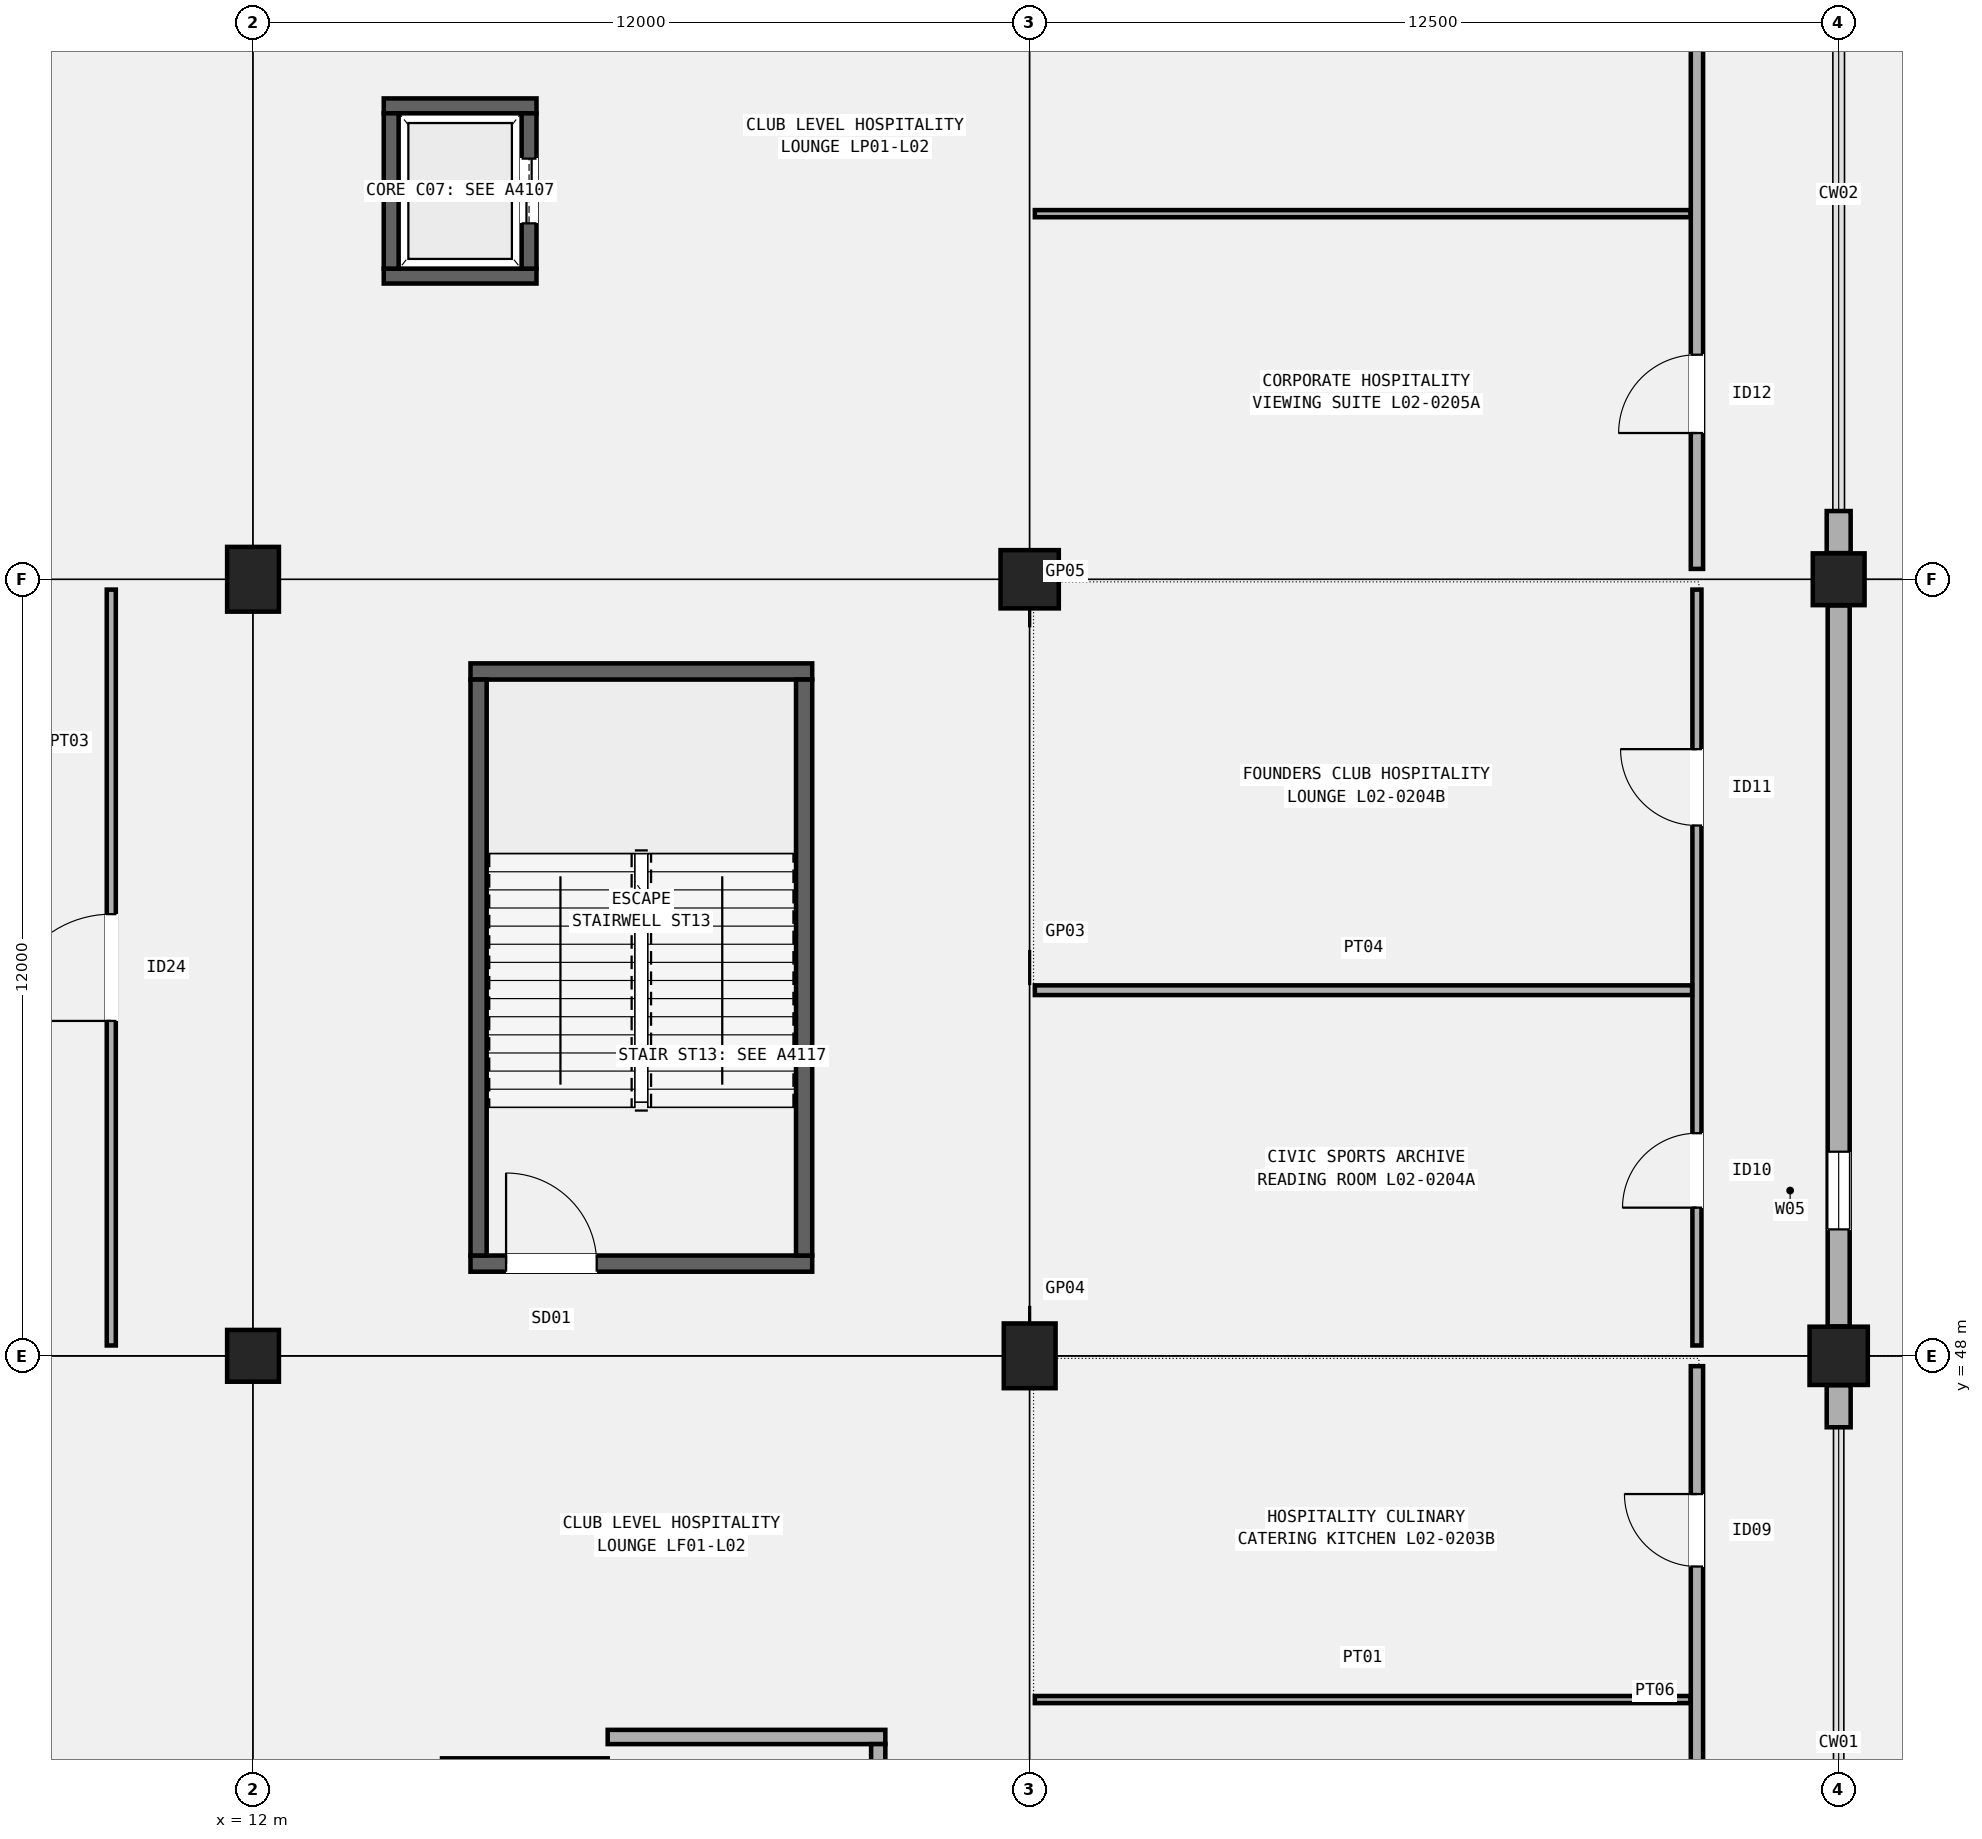
"""IFC4 building model, lengths in metres.
Left out: names, types, materials, properties, quantities, classifications, styles, units other than length and angle.
Written with IfcOpenShell. Run it as: python <this file> out.ifc"""

import sys

from ifc_helpers import new_model, si_unit, direction, frame, frame_2d, origin, origin_2d, place, context, subcontext, project, spatial, rectangle, extrude, element, fill, save


model = new_model("IFC4")
c1 = context("Model", 3, precision=1e-05, world=origin(), true_north=direction((0.0, 1.0)))
c2 = subcontext(c1, "Body", "Model", "MODEL_VIEW")
j1 = project(units=[si_unit("LENGTHUNIT", "METRE"), si_unit("PLANEANGLEUNIT", "RADIAN")], contexts=[c1])
p1 = place(None, origin())
s1 = spatial("IfcSite", under=j1, at=p1, CompositionType="ELEMENT")
p2 = place(p1, origin())
s2 = spatial("IfcBuilding", under=s1, at=p2, CompositionType="ELEMENT")
p3 = place(p2, frame((0.0, 0.0, 10.2)))
s3 = spatial("IfcBuildingStorey", under=s2, at=p3, CompositionType="ELEMENT", Elevation=10.2)
p4 = place(p3, frame((12.0, 48.0, 0.0), z_axis=(0.0, 0.0, 1.0), x_axis=(1.0, 0.0, 0.0)))
e1 = element("IfcColumn", 1, at=p4, inside=s3, PredefinedType="COLUMN", context=c2, shape_type="SweptSolid", body=[
    extrude(rectangle(XDim=0.8, YDim=0.8, at=origin_2d()), origin(), (0.0, 0.0, 1.0), 5.1),
])
for number, where, z_axis, x_axis in (
    (2, (12.0, 60.0, 0.0), (0.0, 0.0, 1.0), (1.0, 0.0, 0.0)),
    (3, (24.0, 48.0, 0.0), (0.0, 0.0, 1.0), (1.0, 0.0, 0.0)),
):
    element("IfcColumn", number, at=place(p3, frame(where, z_axis=z_axis, x_axis=x_axis)), inside=s3, PredefinedType="COLUMN", context=c2, shape_type="SweptSolid", body=[
        extrude(rectangle(XDim=0.8, YDim=1.0, at=origin_2d()), origin(), (0.0, 0.0, 1.0), 5.1),
    ])
for number, where, z_axis, x_axis in (
    (4, (24.0, 60.0, 0.0), (0.0, 0.0, 1.0), (1.0, 0.0, 0.0)),
    (5, (36.5, 48.0, 0.0), (0.0, 0.0, 1.0), (1.0, 0.0, 0.0)),
):
    element("IfcColumn", number, at=place(p3, frame(where, z_axis=z_axis, x_axis=x_axis)), inside=s3, PredefinedType="COLUMN", context=c2, shape_type="SweptSolid", body=[
        extrude(rectangle(XDim=0.9, YDim=0.9, at=origin_2d()), origin(), (0.0, 0.0, 1.0), 5.1),
    ])
p5 = place(p3, frame((36.5, 60.0, 0.0), z_axis=(0.0, 0.0, 1.0), x_axis=(1.0, 0.0, 0.0)))
e6 = element("IfcColumn", 6, at=p5, inside=s3, PredefinedType="COLUMN", context=c2, shape_type="SweptSolid", body=[
    extrude(rectangle(XDim=0.8, YDim=0.8, at=origin_2d()), origin(), (0.0, 0.0, 1.0), 5.1),
])
p6 = place(p3, frame((36.5, 46.896, 0.0), z_axis=(0.0, 0.0, 1.0), x_axis=(0.0, 1.0, 0.0)))
e7 = element("IfcWall", 7, at=p6, inside=s3, PredefinedType="SOLIDWALL", context=c2, shape_type="SweptSolid", body=[
    extrude(rectangle(XDim=0.65, YDim=0.37, at=frame_2d((0.325, 0.0))), origin(), (0.0, 0.0, 1.0), 4.02),
])
p7 = place(p3, frame((36.5, 48.454, 0.0), z_axis=(0.0, 0.0, 1.0), x_axis=(0.0, 1.0, 0.0)))
e8 = element("IfcWall", 8, at=p7, inside=s3, PredefinedType="SOLIDWALL", context=c2, shape_type="SweptSolid", body=[
    extrude(rectangle(XDim=11.142, YDim=0.34, at=frame_2d((5.571, 0.0))), origin(), (0.0, 0.0, 1.0), 4.12),
])
p8 = place(p7, frame((1.5, 0.0, 0.95)))
e9 = element("IfcOpeningElement", 9, at=p8, cuts=e8, PredefinedType="OPENING", context=c2, shape_type="SweptSolid", body=[
    extrude(rectangle(XDim=1.2, YDim=1.9, at=frame_2d((0.6, 0.95))), frame((0.0, 0.18, 0.0), z_axis=(0.0, -1.0, 0.0), x_axis=(1.0, 0.0, 0.0)), (0.0, 0.0, 1.0), 0.36),
])
p9 = place(p3, frame((36.5, 60.404, 0.0), z_axis=(0.0, 0.0, 1.0), x_axis=(0.0, 1.0, 0.0)))
e10 = element("IfcWall", 10, at=p9, inside=s3, PredefinedType="SOLIDWALL", context=c2, shape_type="SweptSolid", body=[
    extrude(rectangle(XDim=0.65, YDim=0.37, at=frame_2d((0.325, 0.0))), origin(), (0.0, 0.0, 1.0), 4.232),
])
p10 = place(p3, frame((15.36, 49.425, 0.0), z_axis=(0.0, 0.0, 1.0), x_axis=(1.0, 0.0, 0.0)))
e11 = element("IfcWall", 11, at=p10, inside=s3, PredefinedType="SHEAR", context=c2, shape_type="SweptSolid", body=[
    extrude(rectangle(XDim=5.28, YDim=0.25, at=frame_2d((2.64, 0.0))), origin(), (0.0, 0.0, 1.0), 4.82),
])
p11 = place(p10, frame((0.55, 0.0, 0.0)))
e12 = element("IfcOpeningElement", 12, at=p11, cuts=e11, PredefinedType="OPENING", context=c2, shape_type="SweptSolid", body=[
    extrude(rectangle(XDim=1.4, YDim=2.15, at=frame_2d((0.7, 1.075))), frame((0.0, 0.135, 0.0), z_axis=(0.0, -1.0, 0.0), x_axis=(1.0, 0.0, 0.0)), (0.0, 0.0, 1.0), 0.27),
])
p12 = place(p3, frame((15.36, 58.575, 0.0), z_axis=(0.0, 0.0, 1.0), x_axis=(1.0, 0.0, 0.0)))
e13 = element("IfcWall", 13, at=p12, inside=s3, PredefinedType="SHEAR", context=c2, shape_type="SweptSolid", body=[
    extrude(rectangle(XDim=5.28, YDim=0.25, at=frame_2d((2.64, 0.0))), origin(), (0.0, 0.0, 1.0), 4.82),
])
for number, where, z_axis, x_axis in (
    (14, (15.485, 49.55, 0.0), (0.0, 0.0, 1.0), (0.0, 1.0, 0.0)),
    (15, (20.515, 49.55, 0.0), (0.0, 0.0, 1.0), (0.0, 1.0, 0.0)),
):
    element("IfcWall", number, at=place(p3, frame(where, z_axis=z_axis, x_axis=x_axis)), inside=s3, PredefinedType="SHEAR", context=c2, shape_type="SweptSolid", body=[
        extrude(rectangle(XDim=8.9, YDim=0.25, at=frame_2d((4.45, 0.0))), origin(), (0.0, 0.0, 1.0), 4.82),
    ])
p13 = place(p3, frame((14.92, 41.665, 0.0), z_axis=(0.0, 0.0, 1.0), x_axis=(1.0, 0.0, 0.0)))
e16 = element("IfcWall", 16, at=p13, inside=s3, PredefinedType="SHEAR", context=c2, shape_type="SweptSolid", body=[
    extrude(rectangle(XDim=2.56, YDim=0.23, at=frame_2d((1.28, 0.0))), origin(), (0.0, 0.0, 1.0), 4.82),
])
p14 = place(p3, frame((17.48, 42.11, 0.0), z_axis=(0.0, 0.0, 1.0), x_axis=(1.0, 0.0, 0.0)))
e17 = element("IfcWall", 17, at=p14, inside=s3, PredefinedType="SOLIDWALL", context=c2, shape_type="SweptSolid", body=[
    extrude(rectangle(XDim=4.29, YDim=0.22, at=frame_2d((2.145, 0.0))), origin(), (0.0, 0.0, 1.0), 4.22),
])
p15 = place(p3, frame((21.66, 38.4, 0.0), z_axis=(0.0, 0.0, 1.0), x_axis=(0.0, 1.0, 0.0)))
e18 = element("IfcWall", 18, at=p15, inside=s3, PredefinedType="SOLIDWALL", context=c2, shape_type="SweptSolid", body=[
    extrude(rectangle(XDim=3.6, YDim=0.22, at=frame_2d((1.8, 0.0))), origin(), (0.0, 0.0, 1.0), 4.22),
])
p16 = place(p15, frame((1.15, 0.0, 0.0)))
e19 = element("IfcOpeningElement", 19, at=p16, cuts=e18, PredefinedType="OPENING", context=c2, shape_type="SweptSolid", body=[
    extrude(rectangle(XDim=1.3, YDim=2.15, at=frame_2d((0.65, 1.075))), frame((0.0, 0.12, 0.0), z_axis=(0.0, -1.0, 0.0), x_axis=(1.0, 0.0, 0.0)), (0.0, 0.0, 1.0), 0.24),
])
for number, where, z_axis, x_axis in (
    (20, (14.02, 64.685, 0.0), (0.0, 0.0, 1.0), (1.0, 0.0, 0.0)),
    (21, (14.02, 67.315, 0.0), (0.0, 0.0, 1.0), (1.0, 0.0, 0.0)),
):
    element("IfcWall", number, at=place(p3, frame(where, z_axis=z_axis, x_axis=x_axis)), inside=s3, PredefinedType="SHEAR", context=c2, shape_type="SweptSolid", body=[
        extrude(rectangle(XDim=2.36, YDim=0.23, at=frame_2d((1.18, 0.0))), origin(), (0.0, 0.0, 1.0), 4.82),
    ])
p17 = place(p3, frame((14.135, 64.8, 0.0), z_axis=(0.0, 0.0, 1.0), x_axis=(0.0, 1.0, 0.0)))
e22 = element("IfcWall", 22, at=p17, inside=s3, PredefinedType="SHEAR", context=c2, shape_type="SweptSolid", body=[
    extrude(rectangle(XDim=2.4, YDim=0.23, at=frame_2d((1.2, 0.0))), origin(), (0.0, 0.0, 1.0), 4.82),
])
p18 = place(p3, frame((16.265, 64.8, 0.0), z_axis=(0.0, 0.0, 1.0), x_axis=(0.0, 1.0, 0.0)))
e23 = element("IfcWall", 23, at=p18, inside=s3, PredefinedType="SHEAR", context=c2, shape_type="SweptSolid", body=[
    extrude(rectangle(XDim=2.4, YDim=0.23, at=frame_2d((1.2, 0.0))), origin(), (0.0, 0.0, 1.0), 4.82),
])
p19 = place(p18, frame((0.7, 0.0, 0.0)))
e24 = element("IfcOpeningElement", 24, at=p19, cuts=e23, PredefinedType="OPENING", context=c2, shape_type="SweptSolid", body=[
    extrude(rectangle(XDim=1.0, YDim=2.15, at=frame_2d((0.5, 1.075))), frame((0.0, 0.125, 0.0), z_axis=(0.0, -1.0, 0.0), x_axis=(1.0, 0.0, 0.0)), (0.0, 0.0, 1.0), 0.25),
])
p20 = place(p3, frame((9.81, 48.16, 0.0), z_axis=(0.0, 0.0, 1.0), x_axis=(0.0, 1.0, 0.0)))
e25 = element("IfcWall", 25, at=p20, inside=s3, PredefinedType="PARTITIONING", context=c2, shape_type="SweptSolid", body=[
    extrude(rectangle(XDim=11.68, YDim=0.14, at=frame_2d((5.84, 0.0))), origin(), (0.0, 0.0, 1.0), 4.22),
])
p21 = place(p20, frame((5.015, 0.0, 0.0)))
e26 = element("IfcOpeningElement", 26, at=p21, cuts=e25, PredefinedType="OPENING", context=c2, shape_type="SweptSolid", body=[
    extrude(rectangle(XDim=1.65, YDim=2.28, at=frame_2d((0.825, 1.14))), frame((0.0, 0.08, 0.0), z_axis=(0.0, -1.0, 0.0), x_axis=(1.0, 0.0, 0.0)), (0.0, 0.0, 1.0), 0.16),
])
p22 = place(p3, frame((34.31, 38.12, 0.0), z_axis=(0.0, 0.0, 1.0), x_axis=(0.0, 1.0, 0.0)))
e27 = element("IfcWall", 27, at=p22, inside=s3, PredefinedType="PARTITIONING", context=c2, shape_type="SweptSolid", body=[
    extrude(rectangle(XDim=9.72, YDim=0.19, at=frame_2d((4.86, 0.0))), origin(), (0.0, 0.0, 1.0), 4.22),
])
p23 = place(p22, frame((1.699, 0.0, 0.0)))
e28 = element("IfcOpeningElement", 28, at=p23, cuts=e27, PredefinedType="OPENING", context=c2, shape_type="SweptSolid", body=[
    extrude(rectangle(XDim=1.09, YDim=2.16, at=frame_2d((0.545, 1.08))), frame((0.0, 0.105, 0.0), z_axis=(0.0, -1.0, 0.0), x_axis=(1.0, 0.0, 0.0)), (0.0, 0.0, 1.0), 0.21),
])
p24 = place(p22, frame((6.624, 0.0, 0.0)))
e29 = element("IfcOpeningElement", 29, at=p24, cuts=e27, PredefinedType="OPENING", context=c2, shape_type="SweptSolid", body=[
    extrude(rectangle(XDim=1.12, YDim=2.18, at=frame_2d((0.56, 1.09))), frame((0.0, 0.105, 0.0), z_axis=(0.0, -1.0, 0.0), x_axis=(1.0, 0.0, 0.0)), (0.0, 0.0, 1.0), 0.21),
])
p25 = place(p3, frame((24.08, 42.688, 0.0), z_axis=(0.0, 0.0, 1.0), x_axis=(1.0, 0.0, 0.0)))
e30 = element("IfcWall", 30, at=p25, inside=s3, PredefinedType="PARTITIONING", context=c2, shape_type="SweptSolid", body=[
    extrude(rectangle(XDim=10.13, YDim=0.11, at=frame_2d((5.065, 0.0))), origin(), (0.0, 0.0, 1.0), 4.22),
])
p26 = place(p3, frame((34.31, 48.16, 0.0), z_axis=(0.0, 0.0, 1.0), x_axis=(0.0, 1.0, 0.0)))
e31 = element("IfcWall", 31, at=p26, inside=s3, PredefinedType="PARTITIONING", context=c2, shape_type="SweptSolid", body=[
    extrude(rectangle(XDim=11.68, YDim=0.14, at=frame_2d((5.84, 0.0))), origin(), (0.0, 0.0, 1.0), 4.22),
])
p27 = place(p26, frame((2.13, 0.0, 0.0)))
e32 = element("IfcOpeningElement", 32, at=p27, cuts=e31, PredefinedType="OPENING", context=c2, shape_type="SweptSolid", body=[
    extrude(rectangle(XDim=1.15, YDim=2.15, at=frame_2d((0.575, 1.075))), frame((0.0, 0.08, 0.0), z_axis=(0.0, -1.0, 0.0), x_axis=(1.0, 0.0, 0.0)), (0.0, 0.0, 1.0), 0.16),
])
p28 = place(p26, frame((8.035, 0.0, 0.0)))
e33 = element("IfcOpeningElement", 33, at=p28, cuts=e31, PredefinedType="OPENING", context=c2, shape_type="SweptSolid", body=[
    extrude(rectangle(XDim=1.18, YDim=2.2, at=frame_2d((0.59, 1.1))), frame((0.0, 0.08, 0.0), z_axis=(0.0, -1.0, 0.0), x_axis=(1.0, 0.0, 0.0)), (0.0, 0.0, 1.0), 0.16),
])
p29 = place(p3, frame((24.08, 53.65, 0.0), z_axis=(0.0, 0.0, 1.0), x_axis=(1.0, 0.0, 0.0)))
e34 = element("IfcWall", 34, at=p29, inside=s3, PredefinedType="PARTITIONING", context=c2, shape_type="SweptSolid", body=[
    extrude(rectangle(XDim=10.155, YDim=0.15, at=frame_2d((5.078, 0.0))), origin(), (0.0, 0.0, 1.0), 4.22),
])
p30 = place(p3, frame((34.31, 60.16, 0.0), z_axis=(0.0, 0.0, 1.0), x_axis=(0.0, 1.0, 0.0)))
e35 = element("IfcWall", 35, at=p30, inside=s3, PredefinedType="PARTITIONING", context=c2, shape_type="SweptSolid", body=[
    extrude(rectangle(XDim=11.68, YDim=0.19, at=frame_2d((5.84, 0.0))), origin(), (0.0, 0.0, 1.0), 4.22),
])
p31 = place(p30, frame((2.1, 0.0, 0.0)))
e36 = element("IfcOpeningElement", 36, at=p31, cuts=e35, PredefinedType="OPENING", context=c2, shape_type="SweptSolid", body=[
    extrude(rectangle(XDim=1.21, YDim=2.18, at=frame_2d((0.605, 1.09))), frame((0.0, 0.105, 0.0), z_axis=(0.0, -1.0, 0.0), x_axis=(1.0, 0.0, 0.0)), (0.0, 0.0, 1.0), 0.21),
])
p32 = place(p30, frame((8.005, 0.0, 0.0)))
e37 = element("IfcOpeningElement", 37, at=p32, cuts=e35, PredefinedType="OPENING", context=c2, shape_type="SweptSolid", body=[
    extrude(rectangle(XDim=1.24, YDim=2.22, at=frame_2d((0.62, 1.11))), frame((0.0, 0.105, 0.0), z_axis=(0.0, -1.0, 0.0), x_axis=(1.0, 0.0, 0.0)), (0.0, 0.0, 1.0), 0.21),
])
p33 = place(p3, frame((24.08, 65.65, 0.0), z_axis=(0.0, 0.0, 1.0), x_axis=(1.0, 0.0, 0.0)))
e38 = element("IfcWall", 38, at=p33, inside=s3, PredefinedType="PARTITIONING", context=c2, shape_type="SweptSolid", body=[
    extrude(rectangle(XDim=10.13, YDim=0.11, at=frame_2d((5.065, 0.0))), origin(), (0.0, 0.0, 1.0), 4.22),
])
p34 = place(p8, origin())
e39 = element("IfcWindow", 39, at=p34, inside=s3, PartitioningType="SINGLE_PANEL", PredefinedType="WINDOW", context=c2, shape_type="SweptSolid", body=[
    extrude(rectangle(XDim=1.2, YDim=1.9, at=frame_2d((0.6, 0.95))), frame((0.0, 0.03, 0.0), z_axis=(0.0, -1.0, 0.0), x_axis=(1.0, 0.0, 0.0)), (0.0, 0.0, 1.0), 0.06),
])
fill(e9, e39)
p35 = place(p11, origin())
e40 = element("IfcDoor", 40, at=p35, inside=s3, OperationType="SINGLE_SWING_LEFT", PredefinedType="DOOR", context=c2, shape_type="SweptSolid", body=[
    extrude(rectangle(XDim=1.4, YDim=2.15, at=frame_2d((0.7, 1.075))), frame((0.0, 0.025, 0.0), z_axis=(0.0, -1.0, 0.0), x_axis=(1.0, 0.0, 0.0)), (0.0, 0.0, 1.0), 0.05),
])
fill(e12, e40)
p36 = place(p19, origin())
e41 = element("IfcDoor", 41, at=p36, inside=s3, OperationType="DOUBLE_DOOR_SLIDING", PredefinedType="DOOR", context=c2, shape_type="SweptSolid", body=[
    extrude(rectangle(XDim=1.0, YDim=2.15, at=frame_2d((0.5, 1.075))), frame((0.0, 0.025, 0.0), z_axis=(0.0, -1.0, 0.0), x_axis=(1.0, 0.0, 0.0)), (0.0, 0.0, 1.0), 0.05),
])
fill(e24, e41)
p37 = place(p21, origin())
e42 = element("IfcDoor", 42, at=p37, inside=s3, OperationType="SINGLE_SWING_LEFT", PredefinedType="DOOR", context=c2, shape_type="SweptSolid", body=[
    extrude(rectangle(XDim=1.65, YDim=2.28, at=frame_2d((0.825, 1.14))), frame((0.0, 0.025, 0.0), z_axis=(0.0, -1.0, 0.0), x_axis=(1.0, 0.0, 0.0)), (0.0, 0.0, 1.0), 0.05),
])
fill(e26, e42)
p38 = place(p24, origin())
e43 = element("IfcDoor", 43, at=p38, inside=s3, OperationType="SINGLE_SWING_RIGHT", PredefinedType="DOOR", context=c2, shape_type="SweptSolid", body=[
    extrude(rectangle(XDim=1.12, YDim=2.18, at=frame_2d((0.56, 1.09))), frame((0.0, 0.025, 0.0), z_axis=(0.0, -1.0, 0.0), x_axis=(1.0, 0.0, 0.0)), (0.0, 0.0, 1.0), 0.05),
])
fill(e29, e43)
p39 = place(p27, origin())
e44 = element("IfcDoor", 44, at=p39, inside=s3, OperationType="SINGLE_SWING_LEFT", PredefinedType="DOOR", context=c2, shape_type="SweptSolid", body=[
    extrude(rectangle(XDim=1.15, YDim=2.15, at=frame_2d((0.575, 1.075))), frame((0.0, 0.025, 0.0), z_axis=(0.0, -1.0, 0.0), x_axis=(1.0, 0.0, 0.0)), (0.0, 0.0, 1.0), 0.05),
])
fill(e32, e44)
p40 = place(p28, origin())
e45 = element("IfcDoor", 45, at=p40, inside=s3, OperationType="SINGLE_SWING_RIGHT", PredefinedType="DOOR", context=c2, shape_type="SweptSolid", body=[
    extrude(rectangle(XDim=1.18, YDim=2.2, at=frame_2d((0.59, 1.1))), frame((0.0, 0.025, 0.0), z_axis=(0.0, -1.0, 0.0), x_axis=(1.0, 0.0, 0.0)), (0.0, 0.0, 1.0), 0.05),
])
fill(e33, e45)
p41 = place(p31, origin())
e46 = element("IfcDoor", 46, at=p41, inside=s3, OperationType="SINGLE_SWING_LEFT", PredefinedType="DOOR", context=c2, shape_type="SweptSolid", body=[
    extrude(rectangle(XDim=1.21, YDim=2.18, at=frame_2d((0.605, 1.09))), frame((0.0, 0.025, 0.0), z_axis=(0.0, -1.0, 0.0), x_axis=(1.0, 0.0, 0.0)), (0.0, 0.0, 1.0), 0.05),
])
fill(e36, e46)
save(model, sys.argv[1])
